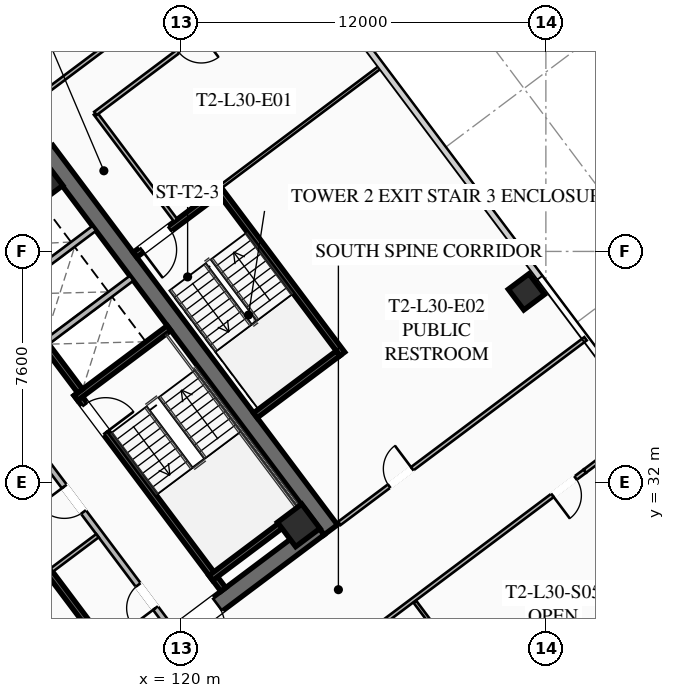
"""IFC4 building model, lengths in metres.
Left out: names, types, materials, properties, quantities, classifications, styles, units other than length and angle.
Written with IfcOpenShell. Run it as: python <this file> out.ifc"""

import sys

from ifc_helpers import new_model, si_unit, direction, frame, frame_2d, origin, origin_2d, place, context, subcontext, project, spatial, rectangle, hollow_rectangle, extrude, element, fill, save


model = new_model("IFC4")
c1 = context("Model", 3, precision=1e-05, world=origin(), true_north=direction((0.0, 1.0)))
c2 = subcontext(c1, "Body", "Model", "MODEL_VIEW")
j1 = project(units=[si_unit("LENGTHUNIT", "METRE"), si_unit("PLANEANGLEUNIT", "RADIAN")], contexts=[c1])
p1 = place(None, origin())
s1 = spatial("IfcSite", under=j1, at=p1, CompositionType="ELEMENT")
p2 = place(p1, origin())
s2 = spatial("IfcBuilding", under=s1, at=p2, CompositionType="ELEMENT")
p3 = place(p2, frame((0.0, 0.0, 114.4)))
s3 = spatial("IfcBuildingStorey", under=s2, at=p3, CompositionType="ELEMENT", Elevation=114.4)
p4 = place(p3, frame((115.564, 42.923, 0.0), z_axis=(0.0, 0.0, 1.0), x_axis=(0.600005007985, -0.799996243986, 0.0)))
e1 = element("IfcWall", 1, at=p4, inside=s3, PredefinedType="SHEAR", context=c2, shape_type="SweptSolid", body=[
    extrude(rectangle(XDim=15.6, YDim=0.55, at=frame_2d((7.8, 0.0))), origin(), (0.0, 0.0, 1.0), 3.55),
])
p5 = place(p3, frame((124.539, 30.498, 0.0), z_axis=(0.0, 0.0, 1.0), x_axis=(-0.799998054672, -0.600002593761, 0.0)))
e2 = element("IfcWall", 2, at=p5, inside=s3, PredefinedType="SHEAR", context=c2, shape_type="SweptSolid", body=[
    extrude(rectangle(XDim=15.06, YDim=0.55, at=frame_2d((7.53, 0.0))), origin(), (0.0, 0.0, 1.0), 3.55),
])
p6 = place(p5, frame((9.23, 0.0, 0.0)))
e3 = element("IfcOpeningElement", 3, at=p6, cuts=e2, PredefinedType="OPENING", context=c2, shape_type="SweptSolid", body=[
    extrude(rectangle(XDim=1.25, YDim=2.25, at=frame_2d((0.625, 1.125))), frame((0.0, 0.285, 0.0), z_axis=(0.0, -1.0, 0.0), x_axis=(1.0, 0.0, 0.0)), (0.0, 0.0, 1.0), 0.57),
])
p7 = place(p5, frame((4.18, 0.0, 0.0)))
e4 = element("IfcOpeningElement", 4, at=p7, cuts=e2, PredefinedType="OPENING", context=c2, shape_type="SweptSolid", body=[
    extrude(rectangle(XDim=1.25, YDim=2.25, at=frame_2d((0.625, 1.125))), frame((0.0, 0.285, 0.0), z_axis=(0.0, -1.0, 0.0), x_axis=(1.0, 0.0, 0.0)), (0.0, 0.0, 1.0), 0.57),
])
for number, where, z_axis, x_axis in (
    (5, (123.87, 30.59, 0.0), (0.0, 0.0, 1.0), (0.8, 0.6, 0.0)),
    (6, (115.41, 41.87, 0.0), (0.0, 0.0, 1.0), (0.8, 0.6, 0.0)),
):
    element("IfcColumn", number, at=place(p3, frame(where, z_axis=z_axis, x_axis=x_axis)), inside=s3, PredefinedType="COLUMN", context=c2, shape_type="SweptSolid", body=[
        extrude(hollow_rectangle(XDim=1.0, YDim=1.0, WallThickness=0.04, at=origin_2d()), origin(), (0.0, 0.0, 1.0), 3.37),
    ])
p8 = place(p3, frame((131.36, 38.27, 0.0), z_axis=(0.0, 0.0, 1.0), x_axis=(0.799999996291, 0.600000004945, 0.0)))
e7 = element("IfcColumn", 7, at=p8, inside=s3, PredefinedType="COLUMN", context=c2, shape_type="SweptSolid", body=[
    extrude(hollow_rectangle(XDim=0.85, YDim=0.85, WallThickness=0.035, at=origin_2d()), origin(), (0.0, 0.0, 1.0), 3.37),
])
p9 = place(p3, frame((116.56, 34.92, 0.0), z_axis=(0.0, 0.0, 1.0), x_axis=(0.59999029481, -0.8000072788, 0.0)))
e8 = element("IfcWall", 8, at=p9, inside=s3, PredefinedType="SHEAR", context=c2, shape_type="SweptSolid", body=[
    extrude(rectangle(XDim=8.05, YDim=0.2, at=frame_2d((4.025, 0.0))), origin(), (0.0, 0.0, 1.0), 3.37),
])
p10 = place(p9, frame((0.45, 0.0, 0.0)))
e9 = element("IfcOpeningElement", 9, at=p10, cuts=e8, PredefinedType="OPENING", context=c2, shape_type="SweptSolid", body=[
    extrude(rectangle(XDim=1.15, YDim=2.2, at=frame_2d((0.575, 1.1))), frame((0.0, 0.11, 0.0), z_axis=(0.0, -1.0, 0.0), x_axis=(1.0, 0.0, 0.0)), (0.0, 0.0, 1.0), 0.22),
])
for number, where, z_axis, x_axis in (
    (10, (116.54, 34.78, 0.0), (0.0, 0.0, 1.0), (0.8, 0.6, 0.0)),
    (11, (120.98, 28.86, 0.0), (0.0, 0.0, 1.0), (0.8, 0.6, 0.0)),
):
    element("IfcWall", number, at=place(p3, frame(where, z_axis=z_axis, x_axis=x_axis)), inside=s3, PredefinedType="SHEAR", context=c2, shape_type="SweptSolid", body=[
        extrude(rectangle(XDim=3.83, YDim=0.2, at=frame_2d((1.915, 0.0))), origin(), (0.0, 0.0, 1.0), 3.37),
    ])
p11 = place(p3, frame((117.998, 25.936, 0.0), z_axis=(0.0, 0.0, 1.0), x_axis=(-0.600002693989, 0.799997979501, 0.0)))
e12 = element("IfcWall", 12, at=p11, inside=s3, PredefinedType="SHEAR", context=c2, shape_type="SweptSolid", body=[
    extrude(rectangle(XDim=14.5, YDim=0.2, at=frame_2d((7.25, 0.0))), origin(), (0.0, 0.0, 1.0), 3.37),
])
p12 = place(p3, frame((112.81, 40.17, 0.0), z_axis=(0.0, 0.0, 1.0), x_axis=(0.599993943644, -0.800004542231, 0.0)))
e13 = element("IfcWall", 13, at=p12, inside=s3, PredefinedType="SHEAR", context=c2, shape_type="SweptSolid", body=[
    extrude(rectangle(XDim=6.45, YDim=0.2, at=frame_2d((3.225, 0.0))), origin(), (0.0, 0.0, 1.0), 3.37),
])
for number, where, z_axis, x_axis in (
    (14, (115.59, 36.63, 0.0), (0.0, 0.0, 1.0), (0.8, 0.6, 0.0)),
    (15, (114.36, 38.27, 0.0), (0.0, 0.0, 1.0), (0.8, 0.6, 0.0)),
):
    element("IfcWall", number, at=place(p3, frame(where, z_axis=z_axis, x_axis=x_axis)), inside=s3, PredefinedType="SOLIDWALL", context=c2, shape_type="SweptSolid", body=[
        extrude(rectangle(XDim=3.48, YDim=0.2, at=frame_2d((1.74, 0.0))), origin(), (0.0, 0.0, 1.0), 3.37),
    ])
p13 = place(p3, frame((119.67, 27.19, 0.0), z_axis=(0.0, 0.0, 1.0), x_axis=(-0.599988677396, 0.800008491828, 0.0)))
e16 = element("IfcWall", 16, at=p13, inside=s3, PredefinedType="SOLIDWALL", context=c2, shape_type="SweptSolid", body=[
    extrude(rectangle(XDim=6.9, YDim=0.2, at=frame_2d((3.45, 0.0))), origin(), (0.0, 0.0, 1.0), 2.723),
])
p14 = place(p13, frame((0.85, 0.0, 0.0)))
e17 = element("IfcOpeningElement", 17, at=p14, cuts=e16, PredefinedType="OPENING", context=c2, shape_type="SweptSolid", body=[
    extrude(rectangle(XDim=0.95, YDim=2.05, at=frame_2d((0.475, 1.025))), frame((0.0, 0.11, 0.0), z_axis=(0.0, -1.0, 0.0), x_axis=(1.0, 0.0, 0.0)), (0.0, 0.0, 1.0), 0.22),
])
p15 = place(p13, frame((4.8, 0.0, 0.0)))
e18 = element("IfcOpeningElement", 18, at=p15, cuts=e16, PredefinedType="OPENING", context=c2, shape_type="SweptSolid", body=[
    extrude(rectangle(XDim=1.05, YDim=2.2, at=frame_2d((0.525, 1.1))), frame((0.0, 0.11, 0.0), z_axis=(0.0, -1.0, 0.0), x_axis=(1.0, 0.0, 0.0)), (0.0, 0.0, 1.0), 0.22),
])
p16 = place(p3, frame((115.746, 29.122, 0.0), z_axis=(0.0, 0.0, 1.0), x_axis=(0.8, 0.6, 0.0)))
e19 = element("IfcWall", 19, at=p16, inside=s3, PredefinedType="PARTITIONING", context=c2, shape_type="SweptSolid", body=[
    extrude(rectangle(XDim=1.88, YDim=0.135, at=frame_2d((0.94, 0.0))), origin(), (0.0, 0.0, 1.0), 2.723),
])
p17 = place(p3, frame((125.304, 36.228, 0.0), z_axis=(0.0, 0.0, 1.0), x_axis=(-0.59998851072, 0.800008616831, 0.0)))
e20 = element("IfcWall", 20, at=p17, inside=s3, PredefinedType="SHEAR", context=c2, shape_type="SweptSolid", body=[
    extrude(rectangle(XDim=6.8, YDim=0.2, at=frame_2d((3.4, 0.0))), origin(), (0.0, 0.0, 1.0), 3.37),
])
p18 = place(p3, frame((121.204, 41.528, 0.0), z_axis=(0.0, 0.0, 1.0), x_axis=(-0.800017232136, -0.599977023131, 0.0)))
e21 = element("IfcWall", 21, at=p18, inside=s3, PredefinedType="SHEAR", context=c2, shape_type="SweptSolid", body=[
    extrude(rectangle(XDim=3.4, YDim=0.2, at=frame_2d((1.7, 0.0))), origin(), (0.0, 0.0, 1.0), 3.37),
])
p19 = place(p18, frame((1.975, 0.0, 0.0)))
e22 = element("IfcOpeningElement", 22, at=p19, cuts=e21, PredefinedType="OPENING", context=c2, shape_type="SweptSolid", body=[
    extrude(rectangle(XDim=1.15, YDim=2.2, at=frame_2d((0.575, 1.1))), frame((0.0, 0.11, 0.0), z_axis=(0.0, -1.0, 0.0), x_axis=(1.0, 0.0, 0.0)), (0.0, 0.0, 1.0), 0.22),
])
p20 = place(p3, frame((122.444, 34.208, 0.0), z_axis=(0.0, 0.0, 1.0), x_axis=(0.79999138319, 0.600011488909, 0.0)))
e23 = element("IfcWall", 23, at=p20, inside=s3, PredefinedType="SHEAR", context=c2, shape_type="SweptSolid", body=[
    extrude(rectangle(XDim=3.4, YDim=0.2, at=frame_2d((1.7, 0.0))), origin(), (0.0, 0.0, 1.0), 3.37),
])
p21 = place(p3, frame((119.824, 40.618, 0.0), z_axis=(0.0, 0.0, 1.0), x_axis=(-0.599982243973, 0.800013316712, 0.0)))
e24 = element("IfcWall", 24, at=p21, inside=s3, PredefinedType="PARTITIONING", context=c2, shape_type="SweptSolid", body=[
    extrude(rectangle(XDim=4.4, YDim=0.135, at=frame_2d((2.2, 0.0))), origin(), (0.0, 0.0, 1.0), 2.723),
])
p22 = place(p3, frame((95.87, 30.09, 0.0), z_axis=(0.0, 0.0, 1.0), x_axis=(0.799997191971, 0.600003744021, 0.0)))
e25 = element("IfcWall", 25, at=p22, inside=s3, PredefinedType="PARTITIONING", context=c2, shape_type="SweptSolid", body=[
    extrude(rectangle(XDim=31.3, YDim=0.135, at=frame_2d((15.65, 0.0))), origin(), (0.0, 0.0, 1.0), 2.723),
])
p23 = place(p22, frame((0.3, 0.0, 0.0)))
e26 = element("IfcOpeningElement", 26, at=p23, cuts=e25, PredefinedType="OPENING", context=c2, shape_type="SweptSolid", body=[
    extrude(rectangle(XDim=0.95, YDim=2.05, at=frame_2d((0.475, 1.025))), frame((0.0, 0.077, 0.0), z_axis=(0.0, -1.0, 0.0), x_axis=(1.0, 0.0, 0.0)), (0.0, 0.0, 1.0), 0.155),
])
p24 = place(p22, frame((30.05, 0.0, 0.0)))
e27 = element("IfcOpeningElement", 27, at=p24, cuts=e25, PredefinedType="OPENING", context=c2, shape_type="SweptSolid", body=[
    extrude(rectangle(XDim=0.95, YDim=2.05, at=frame_2d((0.475, 1.025))), frame((0.0, 0.077, 0.0), z_axis=(0.0, -1.0, 0.0), x_axis=(1.0, 0.0, 0.0)), (0.0, 0.0, 1.0), 0.155),
])
p25 = place(p3, frame((133.282, 32.374, 0.0), z_axis=(0.0, 0.0, 1.0), x_axis=(-0.8, -0.6, 0.0)))
e28 = element("IfcWall", 28, at=p25, inside=s3, PredefinedType="PARTITIONING", context=c2, shape_type="SweptSolid", body=[
    extrude(rectangle(XDim=31.3, YDim=0.135, at=frame_2d((15.65, 0.0))), origin(), (0.0, 0.0, 1.0), 2.723),
])
p26 = place(p25, frame((29.97, 0.0, 0.0)))
e29 = element("IfcOpeningElement", 29, at=p26, cuts=e28, PredefinedType="OPENING", context=c2, shape_type="SweptSolid", body=[
    extrude(rectangle(XDim=0.95, YDim=2.05, at=frame_2d((0.475, 1.025))), frame((0.0, 0.077, 0.0), z_axis=(0.0, -1.0, 0.0), x_axis=(1.0, 0.0, 0.0)), (0.0, 0.0, 1.0), 0.155),
])
p27 = place(p25, frame((19.151, 0.0, 0.0)))
e30 = element("IfcOpeningElement", 30, at=p27, cuts=e28, PredefinedType="OPENING", context=c2, shape_type="SweptSolid", body=[
    extrude(rectangle(XDim=0.95, YDim=2.05, at=frame_2d((0.475, 1.025))), frame((0.0, 0.077, 0.0), z_axis=(0.0, -1.0, 0.0), x_axis=(1.0, 0.0, 0.0)), (0.0, 0.0, 1.0), 0.155),
])
p28 = place(p25, frame((14.901, 0.0, 0.0)))
e31 = element("IfcOpeningElement", 31, at=p28, cuts=e28, PredefinedType="OPENING", context=c2, shape_type="SweptSolid", body=[
    extrude(rectangle(XDim=0.95, YDim=2.05, at=frame_2d((0.475, 1.025))), frame((0.0, 0.077, 0.0), z_axis=(0.0, -1.0, 0.0), x_axis=(1.0, 0.0, 0.0)), (0.0, 0.0, 1.0), 0.155),
])
p29 = place(p25, frame((10.92, 0.0, 0.0)))
e32 = element("IfcOpeningElement", 32, at=p29, cuts=e28, PredefinedType="OPENING", context=c2, shape_type="SweptSolid", body=[
    extrude(rectangle(XDim=0.95, YDim=2.05, at=frame_2d((0.475, 1.025))), frame((0.0, 0.077, 0.0), z_axis=(0.0, -1.0, 0.0), x_axis=(1.0, 0.0, 0.0)), (0.0, 0.0, 1.0), 0.155),
])
p30 = place(p25, frame((0.38, 0.0, 0.0)))
e33 = element("IfcOpeningElement", 33, at=p30, cuts=e28, PredefinedType="OPENING", context=c2, shape_type="SweptSolid", body=[
    extrude(rectangle(XDim=0.95, YDim=2.05, at=frame_2d((0.475, 1.025))), frame((0.0, 0.077, 0.0), z_axis=(0.0, -1.0, 0.0), x_axis=(1.0, 0.0, 0.0)), (0.0, 0.0, 1.0), 0.155),
])
p31 = place(p3, frame((133.282, 32.374, 0.0), z_axis=(0.0, 0.0, 1.0), x_axis=(0.80002227902, 0.599970293491, 0.0)))
e34 = element("IfcWall", 34, at=p31, inside=s3, PredefinedType="PARTITIONING", context=c2, shape_type="SweptSolid", body=[
    extrude(rectangle(XDim=2.63, YDim=0.135, at=frame_2d((1.315, 0.0))), origin(), (0.0, 0.0, 1.0), 2.723),
])
p32 = place(p3, frame((131.848, 22.536, 0.0), z_axis=(0.0, 0.0, 1.0), x_axis=(-0.599983090003, 0.800012682219, 0.0)))
e35 = element("IfcWall", 35, at=p32, inside=s3, PredefinedType="PARTITIONING", context=c2, shape_type="SweptSolid", body=[
    extrude(rectangle(XDim=6.93, YDim=0.11, at=frame_2d((3.465, 0.0))), origin(), (0.0, 0.0, 1.0), 2.723),
])
p33 = place(p3, frame((123.944, 49.208, 0.0), z_axis=(0.0, 0.0, 1.0), x_axis=(-0.799996532921, -0.600004622744, 0.0)))
e36 = element("IfcWall", 36, at=p33, inside=s3, PredefinedType="PARTITIONING", context=c2, shape_type="SweptSolid", body=[
    extrude(rectangle(XDim=8.45, YDim=0.135, at=frame_2d((4.225, 0.0))), origin(), (0.0, 0.0, 1.0), 2.723),
])
p34 = place(p33, frame((4.1, 0.0, 0.0)))
e37 = element("IfcOpeningElement", 37, at=p34, cuts=e36, PredefinedType="OPENING", context=c2, shape_type="SweptSolid", body=[
    extrude(rectangle(XDim=0.95, YDim=2.05, at=frame_2d((0.475, 1.025))), frame((0.0, 0.077, 0.0), z_axis=(0.0, -1.0, 0.0), x_axis=(1.0, 0.0, 0.0)), (0.0, 0.0, 1.0), 0.155),
])
p35 = place(p3, frame((125.208, 30.656, 0.0), z_axis=(0.0, 0.0, 1.0), x_axis=(0.799997105034, 0.600003859935, 0.0)))
e38 = element("IfcWall", 38, at=p35, inside=s3, PredefinedType="PARTITIONING", context=c2, shape_type="SweptSolid", body=[
    extrude(rectangle(XDim=10.12, YDim=0.135, at=frame_2d((5.06, 0.0))), origin(), (0.0, 0.0, 1.0), 2.723),
])
p36 = place(p35, frame((2.045, 0.0, 0.0)))
e39 = element("IfcOpeningElement", 39, at=p36, cuts=e38, PredefinedType="OPENING", context=c2, shape_type="SweptSolid", body=[
    extrude(rectangle(XDim=0.95, YDim=2.05, at=frame_2d((0.475, 1.025))), frame((0.0, 0.077, 0.0), z_axis=(0.0, -1.0, 0.0), x_axis=(1.0, 0.0, 0.0)), (0.0, 0.0, 1.0), 0.155),
])
p37 = place(p3, frame((126.584, 45.688, 0.0), z_axis=(0.0, 0.0, 1.0), x_axis=(-0.800004438899, -0.599994081423, 0.0)))
e40 = element("IfcWall", 40, at=p37, inside=s3, PredefinedType="PARTITIONING", context=c2, shape_type="SweptSolid", body=[
    extrude(rectangle(XDim=6.6, YDim=0.11, at=frame_2d((3.3, 0.0))), origin(), (0.0, 0.0, 1.0), 2.723),
])
p38 = place(p7, origin())
e41 = element("IfcDoor", 41, at=p38, inside=s3, OperationType="SINGLE_SWING_RIGHT", PredefinedType="DOOR", context=c2, shape_type="SweptSolid", body=[
    extrude(rectangle(XDim=1.25, YDim=2.25, at=frame_2d((0.625, 1.125))), frame((0.0, 0.025, 0.0), z_axis=(0.0, -1.0, 0.0), x_axis=(1.0, 0.0, 0.0)), (0.0, 0.0, 1.0), 0.05),
])
fill(e4, e41)
p39 = place(p10, origin())
e42 = element("IfcDoor", 42, at=p39, inside=s3, OperationType="SINGLE_SWING_RIGHT", PredefinedType="DOOR", context=c2, shape_type="SweptSolid", body=[
    extrude(rectangle(XDim=1.15, YDim=2.2, at=frame_2d((0.575, 1.1))), frame((0.0, 0.025, 0.0), z_axis=(0.0, -1.0, 0.0), x_axis=(1.0, 0.0, 0.0)), (0.0, 0.0, 1.0), 0.05),
])
fill(e9, e42)
p40 = place(p14, origin())
e43 = element("IfcDoor", 43, at=p40, inside=s3, OperationType="SINGLE_SWING_LEFT", PredefinedType="DOOR", context=c2, shape_type="SweptSolid", body=[
    extrude(rectangle(XDim=0.95, YDim=2.05, at=frame_2d((0.475, 1.025))), frame((0.0, 0.025, 0.0), z_axis=(0.0, -1.0, 0.0), x_axis=(1.0, 0.0, 0.0)), (0.0, 0.0, 1.0), 0.05),
])
fill(e17, e43)
p41 = place(p15, origin())
e44 = element("IfcDoor", 44, at=p41, inside=s3, OperationType="SINGLE_SWING_RIGHT", PredefinedType="DOOR", context=c2, shape_type="SweptSolid", body=[
    extrude(rectangle(XDim=1.05, YDim=2.2, at=frame_2d((0.525, 1.1))), frame((0.0, 0.025, 0.0), z_axis=(0.0, -1.0, 0.0), x_axis=(1.0, 0.0, 0.0)), (0.0, 0.0, 1.0), 0.05),
])
fill(e18, e44)
p42 = place(p19, origin())
e45 = element("IfcDoor", 45, at=p42, inside=s3, OperationType="SINGLE_SWING_RIGHT", PredefinedType="DOOR", context=c2, shape_type="SweptSolid", body=[
    extrude(rectangle(XDim=1.15, YDim=2.2, at=frame_2d((0.575, 1.1))), frame((0.0, 0.025, 0.0), z_axis=(0.0, -1.0, 0.0), x_axis=(1.0, 0.0, 0.0)), (0.0, 0.0, 1.0), 0.05),
])
fill(e22, e45)
p43 = place(p30, origin())
e46 = element("IfcDoor", 46, at=p43, inside=s3, OperationType="SINGLE_SWING_RIGHT", PredefinedType="DOOR", context=c2, shape_type="SweptSolid", body=[
    extrude(rectangle(XDim=0.95, YDim=2.05, at=frame_2d((0.475, 1.025))), frame((0.0, 0.025, 0.0), z_axis=(0.0, -1.0, 0.0), x_axis=(1.0, 0.0, 0.0)), (0.0, 0.0, 1.0), 0.05),
])
fill(e33, e46)
p44 = place(p36, origin())
e47 = element("IfcDoor", 47, at=p44, inside=s3, OperationType="SINGLE_SWING_RIGHT", PredefinedType="DOOR", context=c2, shape_type="SweptSolid", body=[
    extrude(rectangle(XDim=0.95, YDim=2.05, at=frame_2d((0.475, 1.025))), frame((0.0, 0.025, 0.0), z_axis=(0.0, -1.0, 0.0), x_axis=(1.0, 0.0, 0.0)), (0.0, 0.0, 1.0), 0.05),
])
fill(e39, e47)
save(model, sys.argv[1])
